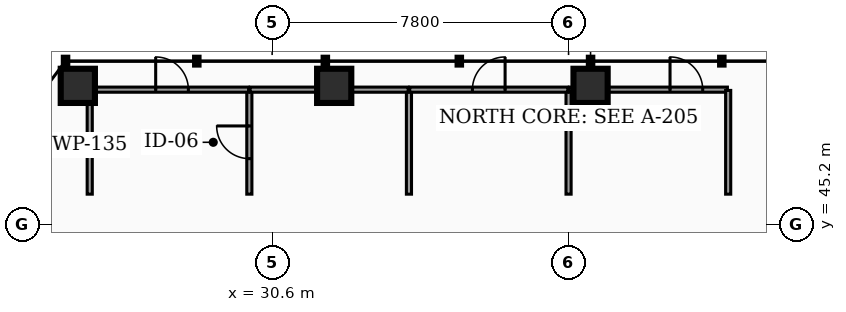
"""IFC4 building model, lengths in metres.
Left out: names, types, materials, properties, quantities, classifications, styles, units other than length and angle.
Written with IfcOpenShell. Run it as: python <this file> out.ifc"""

import sys

from ifc_helpers import new_model, si_unit, direction, frame, frame_2d, origin, origin_2d, place, context, subcontext, project, spatial, rectangle, hollow_rectangle, extrude, element, fill, save


model = new_model("IFC4")
c1 = context("Model", 3, precision=1e-05, world=origin(), true_north=direction((0.0, 1.0)))
c2 = subcontext(c1, "Body", "Model", "MODEL_VIEW")
j1 = project(units=[si_unit("LENGTHUNIT", "METRE"), si_unit("PLANEANGLEUNIT", "RADIAN")], contexts=[c1])
p1 = place(None, origin())
s1 = spatial("IfcSite", under=j1, at=p1, CompositionType="ELEMENT")
p2 = place(p1, origin())
s2 = spatial("IfcBuilding", under=s1, at=p2, CompositionType="ELEMENT")
p3 = place(p2, frame((0.0, 0.0, 105.06)))
s3 = spatial("IfcBuildingStorey", under=s2, at=p3, CompositionType="ELEMENT", Elevation=105.06)
p4 = place(p3, frame((38.979, 48.85, 0.0), z_axis=(-0.00497197876, -0.031271129567, 0.999498572227), x_axis=(0.987594874064, -0.15702345278, 0.0)))
e1 = element("IfcColumn", 1, at=p4, inside=s3, PredefinedType="COLUMN", context=c2, shape_type="SweptSolid", body=[
    extrude(hollow_rectangle(XDim=0.9, YDim=0.9, WallThickness=0.045, at=origin_2d()), origin(), (0.0, 0.0, 1.0), 3.732),
])
p5 = place(p3, frame((32.233, 48.85, 0.0), z_axis=(-0.073076267852, -0.031187907173, 0.996838589503), x_axis=(0.392531312989, -0.919738641312, 0.0)))
e2 = element("IfcColumn", 2, at=p5, inside=s3, PredefinedType="COLUMN", context=c2, shape_type="SweptSolid", body=[
    extrude(hollow_rectangle(XDim=0.9, YDim=0.9, WallThickness=0.045, at=origin_2d()), origin(), (0.0, 0.0, 1.0), 3.742),
])
p6 = place(p3, frame((25.487, 48.85, 0.0), z_axis=(-0.140111029019, -0.030963047559, 0.989651549402), x_axis=(0.215783146828, -0.976441310855, 0.0)))
e3 = element("IfcColumn", 3, at=p6, inside=s3, PredefinedType="COLUMN", context=c2, shape_type="SweptSolid", body=[
    extrude(hollow_rectangle(XDim=0.9, YDim=0.9, WallThickness=0.045, at=origin_2d()), origin(), (0.0, 0.0, 1.0), 3.769),
])
p7 = place(p3, frame((30.0, 46.0, 0.0), z_axis=(0.0, 0.0, 1.0), x_axis=(0.0, 1.0, 0.0)))
e4 = element("IfcWall", 4, at=p7, inside=s3, PredefinedType="PARTITIONING", context=c2, shape_type="SweptSolid", body=[
    extrude(rectangle(XDim=2.73, YDim=0.135, at=frame_2d((1.365, 0.0))), origin(), (0.0, 0.0, 1.0), 2.687),
])
p8 = place(p7, frame((0.935, 0.0, 0.0)))
e5 = element("IfcOpeningElement", 5, at=p8, cuts=e4, PredefinedType="OPENING", context=c2, shape_type="SweptSolid", body=[
    extrude(rectangle(XDim=0.86, YDim=2.05, at=frame_2d((0.43, 1.025))), frame((0.0, 0.077, 0.0), z_axis=(0.0, -1.0, 0.0), x_axis=(1.0, 0.0, 0.0)), (0.0, 0.0, 1.0), 0.155),
])
p9 = place(p3, frame((25.951, 48.75, 0.0), z_axis=(0.0, 0.0, 1.0), x_axis=(1.0, 0.0, 0.0)))
e6 = element("IfcWall", 6, at=p9, inside=s3, PredefinedType="PARTITIONING", context=c2, shape_type="SweptSolid", body=[
    extrude(rectangle(XDim=4.029, YDim=0.135, at=frame_2d((2.015, 0.0))), origin(), (0.0, 0.0, 1.0), 2.687),
])
p10 = place(p9, frame((1.584, 0.0, 0.0)))
e7 = element("IfcOpeningElement", 7, at=p10, cuts=e6, PredefinedType="OPENING", context=c2, shape_type="SweptSolid", body=[
    extrude(rectangle(XDim=0.86, YDim=2.05, at=frame_2d((0.43, 1.025))), frame((0.0, 0.077, 0.0), z_axis=(0.0, -1.0, 0.0), x_axis=(1.0, 0.0, 0.0)), (0.0, 0.0, 1.0), 0.155),
])
p11 = place(p3, frame((25.8, 46.0, 0.0), z_axis=(0.0, 0.0, 1.0), x_axis=(0.0, 1.0, 0.0)))
e8 = element("IfcWall", 8, at=p11, inside=s3, PredefinedType="PARTITIONING", context=c2, shape_type="SweptSolid", body=[
    extrude(rectangle(XDim=2.599, YDim=0.135, at=frame_2d((1.3, 0.0))), origin(), (0.0, 0.0, 1.0), 2.687),
])
p12 = place(p3, frame((34.2, 46.0, 0.0), z_axis=(0.0, 0.0, 1.0), x_axis=(0.0, 1.0, 0.0)))
e9 = element("IfcWall", 9, at=p12, inside=s3, PredefinedType="PARTITIONING", context=c2, shape_type="SweptSolid", body=[
    extrude(rectangle(XDim=2.73, YDim=0.135, at=frame_2d((1.365, 0.0))), origin(), (0.0, 0.0, 1.0), 2.687),
])
p13 = place(p3, frame((30.02, 48.75, 0.0), z_axis=(0.0, 0.0, 1.0), x_axis=(1.0, 0.0, 0.0)))
e10 = element("IfcWall", 10, at=p13, inside=s3, PredefinedType="PARTITIONING", context=c2, shape_type="SweptSolid", body=[
    extrude(rectangle(XDim=1.755, YDim=0.135, at=frame_2d((0.877, 0.0))), origin(), (0.0, 0.0, 1.0), 2.687),
])
p14 = place(p3, frame((32.198, 48.75, 0.0), z_axis=(0.0, 0.0, 1.0), x_axis=(1.0, 0.0, 0.0)))
e11 = element("IfcWall", 11, at=p14, inside=s3, PredefinedType="PARTITIONING", context=c2, shape_type="SweptSolid", body=[
    extrude(rectangle(XDim=1.982, YDim=0.135, at=frame_2d((0.991, 0.0))), origin(), (0.0, 0.0, 1.0), 2.687),
])
p15 = place(p3, frame((38.4, 46.0, 0.0), z_axis=(0.0, 0.0, 1.0), x_axis=(0.0, 1.0, 0.0)))
e12 = element("IfcWall", 12, at=p15, inside=s3, PredefinedType="PARTITIONING", context=c2, shape_type="SweptSolid", body=[
    extrude(rectangle(XDim=2.73, YDim=0.135, at=frame_2d((1.365, 0.0))), origin(), (0.0, 0.0, 1.0), 2.687),
])
p16 = place(p3, frame((34.22, 48.75, 0.0), z_axis=(0.0, 0.0, 1.0), x_axis=(1.0, 0.0, 0.0)))
e13 = element("IfcWall", 13, at=p16, inside=s3, PredefinedType="PARTITIONING", context=c2, shape_type="SweptSolid", body=[
    extrude(rectangle(XDim=4.16, YDim=0.135, at=frame_2d((2.08, 0.0))), origin(), (0.0, 0.0, 1.0), 2.687),
])
p17 = place(p16, frame((1.65, 0.0, 0.0)))
e14 = element("IfcOpeningElement", 14, at=p17, cuts=e13, PredefinedType="OPENING", context=c2, shape_type="SweptSolid", body=[
    extrude(rectangle(XDim=0.86, YDim=2.05, at=frame_2d((0.43, 1.025))), frame((0.0, 0.077, 0.0), z_axis=(0.0, -1.0, 0.0), x_axis=(1.0, 0.0, 0.0)), (0.0, 0.0, 1.0), 0.155),
])
p18 = place(p3, frame((38.42, 48.75, 0.0), z_axis=(0.0, 0.0, 1.0), x_axis=(1.0, 0.0, 0.0)))
e15 = element("IfcWall", 15, at=p18, inside=s3, PredefinedType="PARTITIONING", context=c2, shape_type="SweptSolid", body=[
    extrude(rectangle(XDim=4.16, YDim=0.135, at=frame_2d((2.08, 0.0))), origin(), (0.0, 0.0, 1.0), 2.687),
])
p19 = place(p18, frame((2.65, 0.0, 0.0)))
e16 = element("IfcOpeningElement", 16, at=p19, cuts=e15, PredefinedType="OPENING", context=c2, shape_type="SweptSolid", body=[
    extrude(rectangle(XDim=0.86, YDim=2.05, at=frame_2d((0.43, 1.025))), frame((0.0, 0.077, 0.0), z_axis=(0.0, -1.0, 0.0), x_axis=(1.0, 0.0, 0.0)), (0.0, 0.0, 1.0), 0.155),
])
p20 = place(p3, frame((42.6, 46.0, 0.0), z_axis=(0.0, 0.0, 1.0), x_axis=(0.0, 1.0, 0.0)))
e17 = element("IfcWall", 17, at=p20, inside=s3, PredefinedType="PARTITIONING", context=c2, shape_type="SweptSolid", body=[
    extrude(rectangle(XDim=2.73, YDim=0.135, at=frame_2d((1.365, 0.0))), origin(), (0.0, 0.0, 1.0), 2.687),
])
p21 = place(p3, frame((32.0, 48.977, 0.0), z_axis=(0.0, 0.0, 1.0), x_axis=(0.0, 1.0, 0.0)))
e18 = element("IfcWall", 18, at=p21, inside=s3, PredefinedType="PARTITIONING", context=c2, shape_type="SweptSolid", body=[
    extrude(rectangle(XDim=0.509, YDim=0.12, at=frame_2d((0.254, 0.0))), origin(), (0.0, 0.0, 1.0), 2.687),
])
p22 = place(p8, origin())
e19 = element("IfcDoor", 19, at=p22, inside=s3, OperationType="SINGLE_SWING_RIGHT", PredefinedType="DOOR", context=c2, shape_type="SweptSolid", body=[
    extrude(rectangle(XDim=0.86, YDim=2.05, at=frame_2d((0.43, 1.025))), frame((0.0, 0.025, 0.0), z_axis=(0.0, -1.0, 0.0), x_axis=(1.0, 0.0, 0.0)), (0.0, 0.0, 1.0), 0.05),
])
fill(e5, e19)
p23 = place(p10, origin())
e20 = element("IfcDoor", 20, at=p23, inside=s3, OperationType="SINGLE_SWING_LEFT", PredefinedType="DOOR", context=c2, shape_type="SweptSolid", body=[
    extrude(rectangle(XDim=0.86, YDim=2.05, at=frame_2d((0.43, 1.025))), frame((0.0, 0.025, 0.0), z_axis=(0.0, -1.0, 0.0), x_axis=(1.0, 0.0, 0.0)), (0.0, 0.0, 1.0), 0.05),
])
fill(e7, e20)
p24 = place(p17, origin())
e21 = element("IfcDoor", 21, at=p24, inside=s3, OperationType="SINGLE_SWING_RIGHT", PredefinedType="DOOR", context=c2, shape_type="SweptSolid", body=[
    extrude(rectangle(XDim=0.86, YDim=2.05, at=frame_2d((0.43, 1.025))), frame((0.0, 0.025, 0.0), z_axis=(0.0, -1.0, 0.0), x_axis=(1.0, 0.0, 0.0)), (0.0, 0.0, 1.0), 0.05),
])
fill(e14, e21)
p25 = place(p19, origin())
e22 = element("IfcDoor", 22, at=p25, inside=s3, OperationType="SINGLE_SWING_LEFT", PredefinedType="DOOR", context=c2, shape_type="SweptSolid", body=[
    extrude(rectangle(XDim=0.86, YDim=2.05, at=frame_2d((0.43, 1.025))), frame((0.0, 0.025, 0.0), z_axis=(0.0, -1.0, 0.0), x_axis=(1.0, 0.0, 0.0)), (0.0, 0.0, 1.0), 0.05),
])
fill(e16, e22)
save(model, sys.argv[1])
